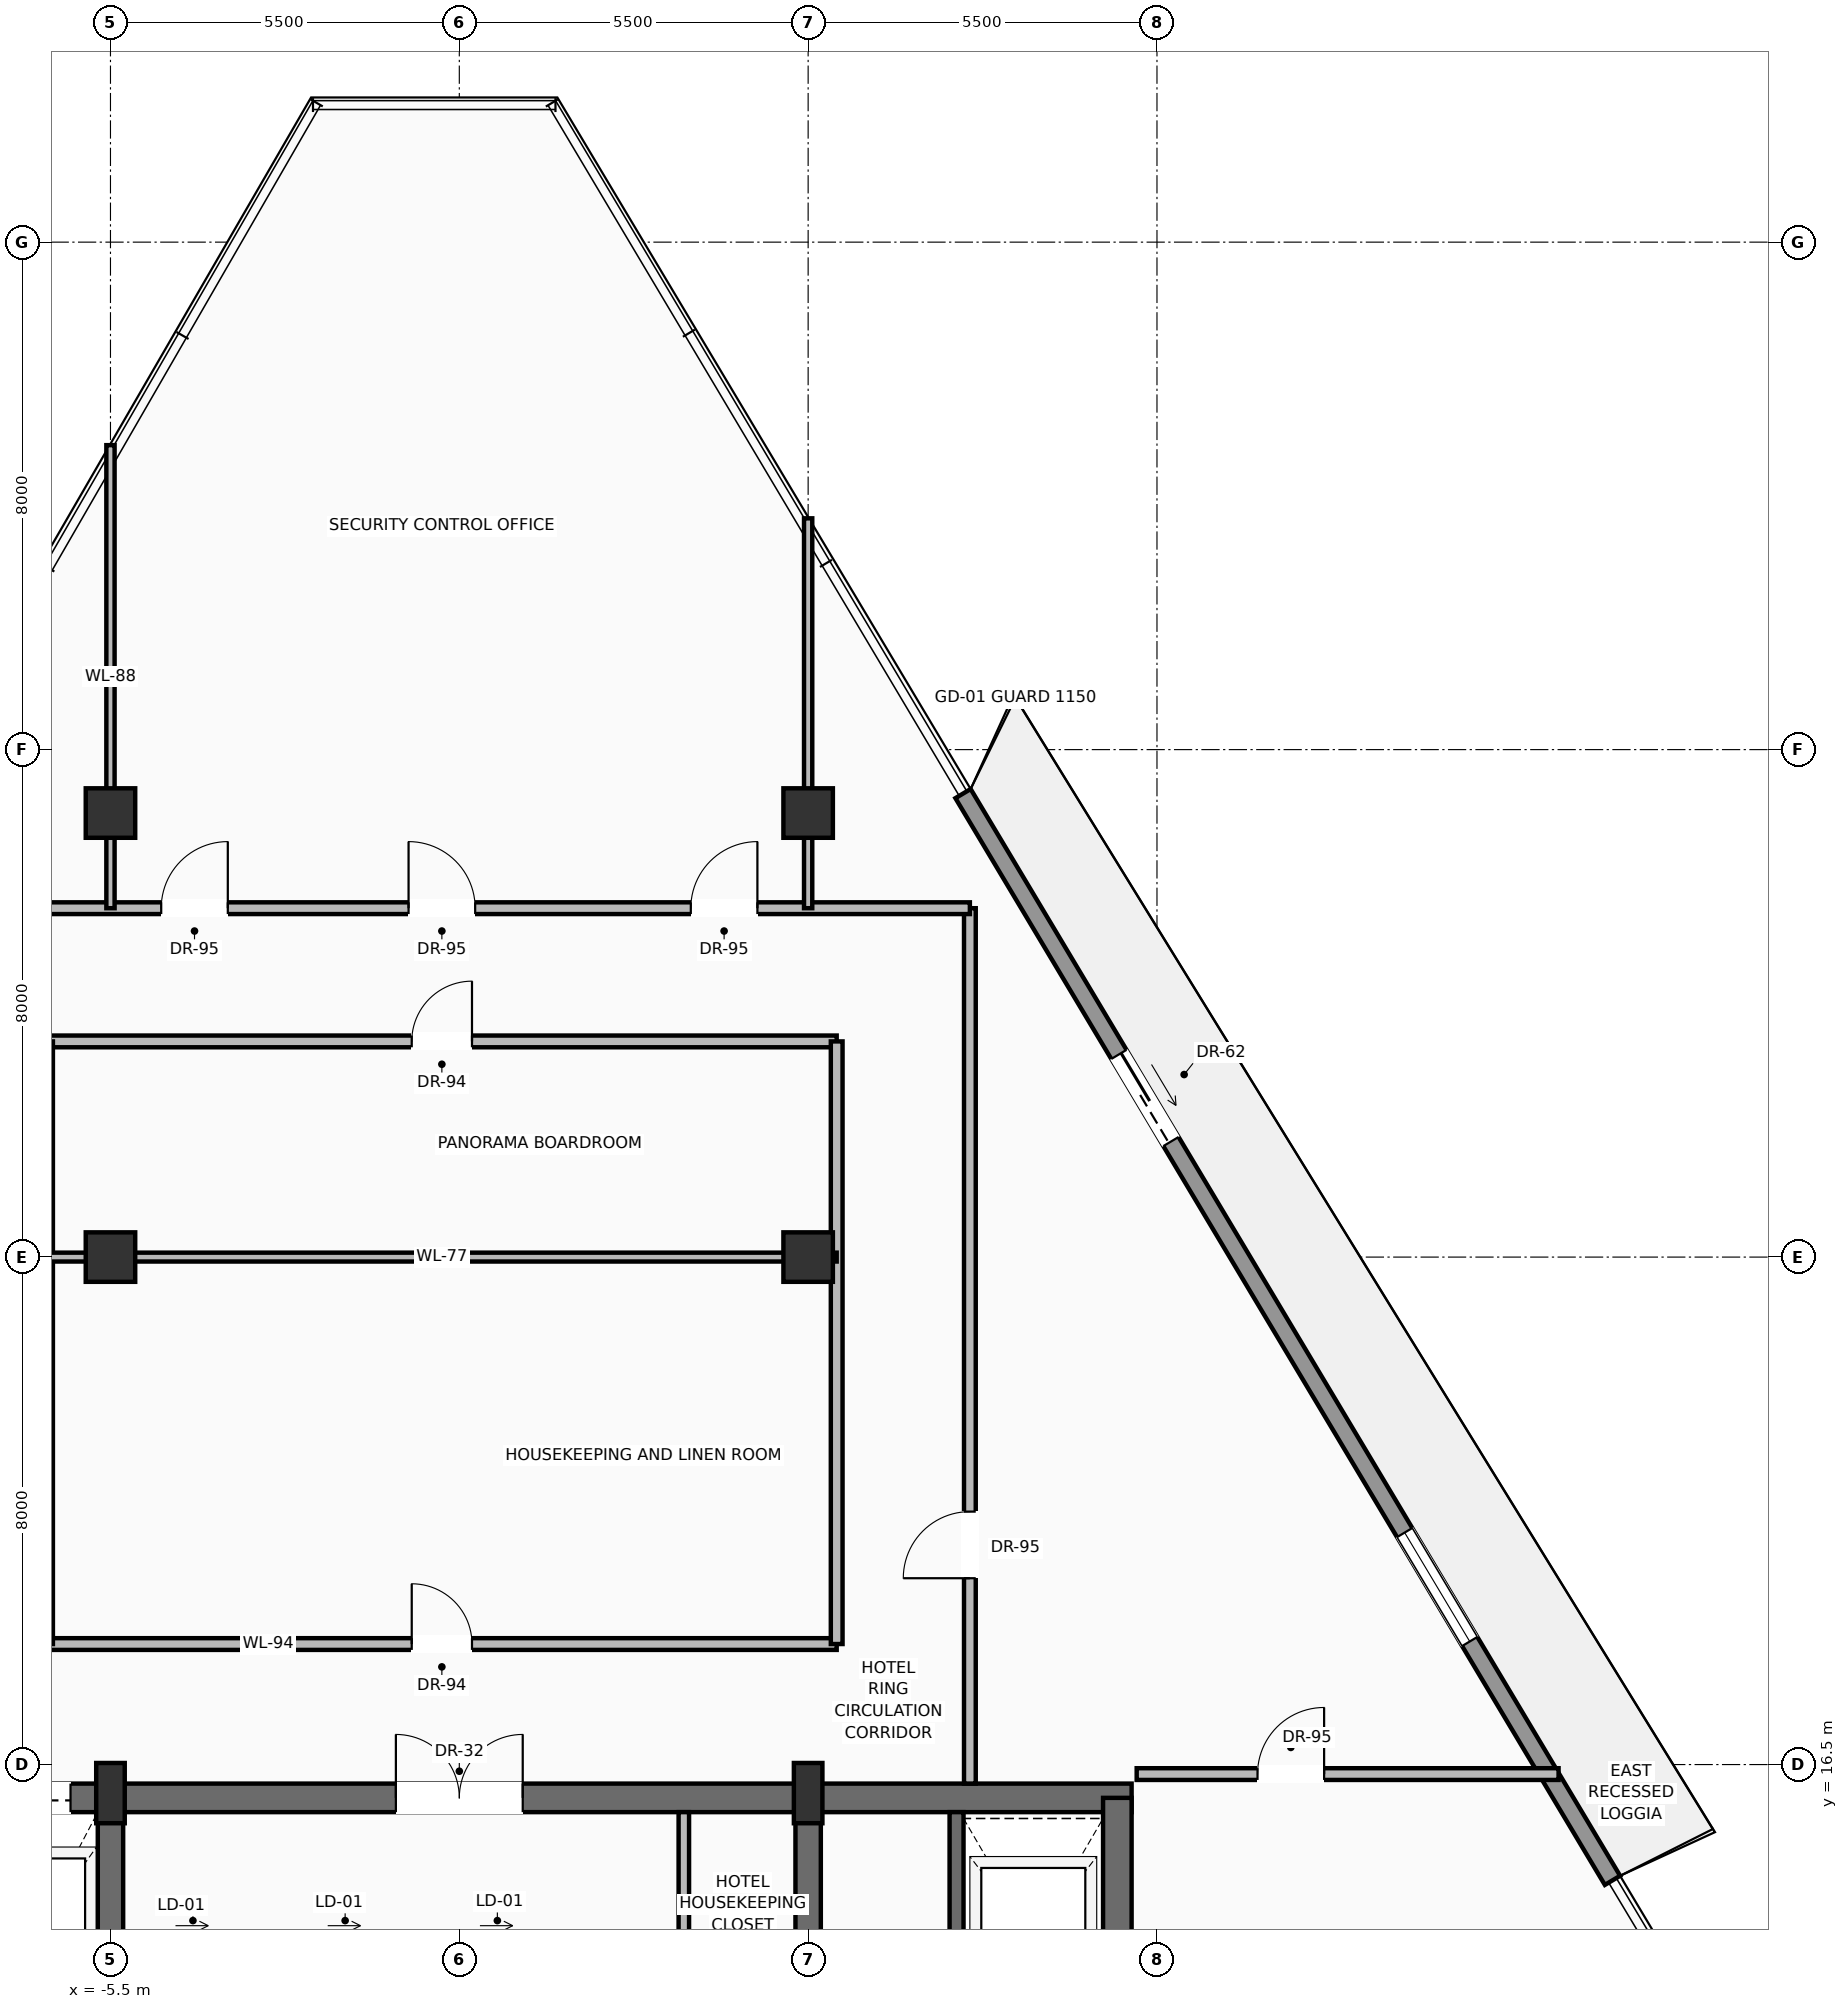
"""IFC4 building model, lengths in metres.
Left out: names, types, materials, properties, quantities, classifications, styles, units other than length and angle.
Written with IfcOpenShell. Run it as: python <this file> out.ifc"""

import sys

from ifc_helpers import new_model, si_unit, direction, frame, frame_2d, origin, origin_2d, place, context, subcontext, project, spatial, rectangle, extrude, source, transform, mapped, element, fill, save


model = new_model("IFC4")
c1 = context("Model", 3, precision=1e-05, world=origin(), true_north=direction((0.0, 1.0)))
c2 = subcontext(c1, "Body", "Model", "MODEL_VIEW")
j1 = project(units=[si_unit("LENGTHUNIT", "METRE"), si_unit("PLANEANGLEUNIT", "RADIAN")], contexts=[c1])
p1 = place(None, origin())
s1 = spatial("IfcSite", under=j1, at=p1, CompositionType="ELEMENT")
p2 = place(p1, origin())
s2 = spatial("IfcBuilding", under=s1, at=p2, CompositionType="ELEMENT")
p3 = place(p2, frame((0.0, 0.0, 269.55)))
s3 = spatial("IfcBuildingStorey", under=s2, at=p3, CompositionType="ELEMENT", Elevation=269.55)
p4 = place(p3, frame((-10.6, 15.975, 0.0), z_axis=(0.0, 0.0, 1.0), x_axis=(1.0, 0.0, 0.0)))
e1 = element("IfcWall", 1, at=p4, inside=s3, PredefinedType="SHEAR", context=c2, shape_type="SweptSolid", body=[
    extrude(rectangle(XDim=21.2, YDim=0.45, at=frame_2d((10.6, 0.0))), origin(), (0.0, 0.0, 1.0), 3.24),
])
p5 = place(p4, frame((3.17, 0.0, 0.0)))
e2 = element("IfcOpeningElement", 2, at=p5, cuts=e1, PredefinedType="OPENING", context=c2, shape_type="SweptSolid", body=[
    extrude(rectangle(XDim=1.3, YDim=2.3, at=frame_2d((0.65, 1.15))), frame((0.0, 0.235, 0.0), z_axis=(0.0, -1.0, 0.0), x_axis=(1.0, 0.0, 0.0)), (0.0, 0.0, 1.0), 0.47),
])
p6 = place(p4, frame((9.6, 0.0, 0.0)))
e3 = element("IfcOpeningElement", 3, at=p6, cuts=e1, PredefinedType="OPENING", context=c2, shape_type="SweptSolid", body=[
    extrude(rectangle(XDim=2.0, YDim=2.4, at=frame_2d((1.0, 1.2))), frame((0.0, 0.235, 0.0), z_axis=(0.0, -1.0, 0.0), x_axis=(1.0, 0.0, 0.0)), (0.0, 0.0, 1.0), 0.47),
])
p7 = place(p3, frame((10.375, 0.625, 0.0), z_axis=(0.0, 0.0, 1.0), x_axis=(0.0, 1.0, 0.0)))
e4 = element("IfcWall", 4, at=p7, inside=s3, PredefinedType="SHEAR", context=c2, shape_type="SweptSolid", body=[
    extrude(rectangle(XDim=15.35, YDim=0.45, at=frame_2d((7.675, 0.0))), origin(), (0.0, 0.0, 1.0), 3.24),
])
p8 = place(p3, frame((-5.5, 0.625, 0.0), z_axis=(0.0, 0.0, 1.0), x_axis=(0.0, 1.0, 0.0)))
e5 = element("IfcWall", 5, at=p8, inside=s3, PredefinedType="SHEAR", context=c2, shape_type="SweptSolid", body=[
    extrude(rectangle(XDim=15.35, YDim=0.4, at=frame_2d((7.675, 0.0))), origin(), (0.0, 0.0, 1.0), 3.24),
])
p9 = place(p8, frame((8.875, 0.0, 0.0)))
e6 = element("IfcOpeningElement", 6, at=p9, cuts=e5, PredefinedType="OPENING", context=c2, shape_type="SweptSolid", body=[
    extrude(rectangle(XDim=1.1, YDim=2.2, at=frame_2d((0.55, 1.1))), frame((0.0, 0.21, 0.0), z_axis=(0.0, -1.0, 0.0), x_axis=(1.0, 0.0, 0.0)), (0.0, 0.0, 1.0), 0.42),
])
p10 = place(p3, frame((5.5, 0.625, 0.0), z_axis=(0.0, 0.0, 1.0), x_axis=(0.0, 1.0, 0.0)))
e7 = element("IfcWall", 7, at=p10, inside=s3, PredefinedType="SHEAR", context=c2, shape_type="SweptSolid", body=[
    extrude(rectangle(XDim=15.35, YDim=0.4, at=frame_2d((7.675, 0.0))), origin(), (0.0, 0.0, 1.0), 3.24),
])
p11 = place(p10, frame((8.875, 0.0, 0.0)))
e8 = element("IfcOpeningElement", 8, at=p11, cuts=e7, PredefinedType="OPENING", context=c2, shape_type="SweptSolid", body=[
    extrude(rectangle(XDim=1.1, YDim=2.2, at=frame_2d((0.55, 1.1))), frame((0.0, 0.21, 0.0), z_axis=(0.0, -1.0, 0.0), x_axis=(1.0, 0.0, 0.0)), (0.0, 0.0, 1.0), 0.42),
])
m1 = source(origin(), c2, "Body", "SweptSolid", [
    extrude(rectangle(XDim=0.45, YDim=0.95, at=origin_2d()), origin(), (0.0, 0.0, 1.0), 3.45),
])
for number, where, z_axis, x_axis in (
    (9, (-5.5, 16.05, 0.0), (0.0, 0.0, 1.0), (1.0, 0.0, 0.0)),
    (10, (5.5, 16.05, 0.0), (0.0, 0.0, 1.0), (1.0, 0.0, 0.0)),
):
    element("IfcColumn", number, at=place(p3, frame(where, z_axis=z_axis, x_axis=x_axis)), inside=s3, PredefinedType="PILASTER", context=c2, shape_type="MappedRepresentation", body=[
        mapped(m1, transform((0.0, 0.0, 0.0), scale=1.0)),
    ])
m2 = source(origin(), c2, "Body", "SweptSolid", [
    extrude(rectangle(XDim=0.78, YDim=0.78, at=origin_2d()), origin(), (0.0, 0.0, 1.0), 3.45),
])
for number, where, z_axis, x_axis in (
    (11, (-5.5, 24.5, 0.0), (0.0, 0.0, 1.0), (1.0, 0.0, 0.0)),
    (12, (5.5, 24.5, 0.0), (0.0, 0.0, 1.0), (1.0, 0.0, 0.0)),
    (13, (-5.5, 31.5, 0.0), (0.0, 0.0, 1.0), (1.0, 0.0, 0.0)),
    (14, (5.5, 31.5, 0.0), (0.0, 0.0, 1.0), (1.0, 0.0, 0.0)),
):
    element("IfcColumn", number, at=place(p3, frame(where, z_axis=z_axis, x_axis=x_axis)), inside=s3, PredefinedType="COLUMN", context=c2, shape_type="MappedRepresentation", body=[
        mapped(m2, transform((0.0, 0.0, 0.0), scale=1.0)),
    ])
p12 = place(p3, frame((7.942, 31.807, 0.0), z_axis=(0.0, 0.0, 1.0), x_axis=(0.513039751496, -0.858364848642, 0.0)))
e15 = element("IfcWall", 15, at=p12, inside=s3, PredefinedType="SOLIDWALL", context=c2, shape_type="SweptSolid", body=[
    extrude(rectangle(XDim=19.959, YDim=0.28, at=frame_2d((9.979, 0.0))), origin(), (0.0, 0.0, 1.0), 2.82),
])
p13 = place(p12, frame((4.79, 0.0, 0.0)))
e16 = element("IfcOpeningElement", 16, at=p13, cuts=e15, PredefinedType="OPENING", context=c2, shape_type="SweptSolid", body=[
    extrude(rectangle(XDim=1.6, YDim=2.35, at=frame_2d((0.8, 1.175))), frame((0.0, 0.15, 0.0), z_axis=(0.0, -1.0, 0.0), x_axis=(1.0, 0.0, 0.0)), (0.0, 0.0, 1.0), 0.3),
])
p14 = place(p12, frame((13.572, 0.0, 0.9)))
e17 = element("IfcOpeningElement", 17, at=p14, cuts=e15, PredefinedType="OPENING", context=c2, shape_type="SweptSolid", body=[
    extrude(rectangle(XDim=2.0, YDim=1.75, at=frame_2d((1.0, 0.875))), frame((0.0, 0.15, 0.0), z_axis=(0.0, -1.0, 0.0), x_axis=(1.0, 0.0, 0.0)), (0.0, 0.0, 1.0), 0.3),
])
p15 = place(p3, frame((7.84, 11.87, 0.0), z_axis=(0.0, 0.0, 1.0), x_axis=(0.0, 1.0, 0.0)))
e18 = element("IfcWall", 18, at=p15, inside=s3, PredefinedType="SOLIDWALL", context=c2, shape_type="SweptSolid", body=[
    extrude(rectangle(XDim=3.88, YDim=0.22, at=frame_2d((1.94, 0.0))), origin(), (0.0, 0.0, 1.0), 3.24),
])
p16 = place(p3, frame((3.54, 11.22, 0.0), z_axis=(0.0, 0.0, 1.0), x_axis=(0.0, 1.0, 0.0)))
e19 = element("IfcWall", 19, at=p16, inside=s3, PredefinedType="PARTITIONING", context=c2, shape_type="SweptSolid", body=[
    extrude(rectangle(XDim=4.53, YDim=0.165, at=frame_2d((2.265, 0.0))), origin(), (0.0, 0.0, 1.0), 3.232),
])
p17 = place(p16, frame((1.25, 0.0, 0.0)))
e20 = element("IfcOpeningElement", 20, at=p17, cuts=e19, PredefinedType="OPENING", context=c2, shape_type="SweptSolid", body=[
    extrude(rectangle(XDim=0.9, YDim=2.1, at=frame_2d((0.45, 1.05))), frame((0.0, 0.093, 0.0), z_axis=(0.0, -1.0, 0.0), x_axis=(1.0, 0.0, 0.0)), (0.0, 0.0, 1.0), 0.185),
])
p18 = place(p3, frame((-6.5, 18.4, 0.0), z_axis=(0.0, 0.0, 1.0), x_axis=(1.0, 0.0, 0.0)))
e21 = element("IfcWall", 21, at=p18, inside=s3, PredefinedType="PARTITIONING", context=c2, shape_type="SweptSolid", body=[
    extrude(rectangle(XDim=12.45, YDim=0.185, at=frame_2d((6.225, 0.0))), origin(), (0.0, 0.0, 1.0), 3.232),
])
p19 = place(p18, frame((5.75, 0.0, 0.0)))
e22 = element("IfcOpeningElement", 22, at=p19, cuts=e21, PredefinedType="OPENING", context=c2, shape_type="SweptSolid", body=[
    extrude(rectangle(XDim=0.95, YDim=2.2, at=frame_2d((0.475, 1.1))), frame((0.0, 0.103, 0.0), z_axis=(0.0, -1.0, 0.0), x_axis=(1.0, 0.0, 0.0)), (0.0, 0.0, 1.0), 0.205),
])
p20 = place(p3, frame((-6.5, 27.9, 0.0), z_axis=(0.0, 0.0, 1.0), x_axis=(1.0, 0.0, 0.0)))
e23 = element("IfcWall", 23, at=p20, inside=s3, PredefinedType="PARTITIONING", context=c2, shape_type="SweptSolid", body=[
    extrude(rectangle(XDim=12.45, YDim=0.185, at=frame_2d((6.225, 0.0))), origin(), (0.0, 0.0, 1.0), 2.885),
])
p21 = place(p20, frame((5.75, 0.0, 0.0)))
e24 = element("IfcOpeningElement", 24, at=p21, cuts=e23, PredefinedType="OPENING", context=c2, shape_type="SweptSolid", body=[
    extrude(rectangle(XDim=0.95, YDim=2.2, at=frame_2d((0.475, 1.1))), frame((0.0, 0.103, 0.0), z_axis=(0.0, -1.0, 0.0), x_axis=(1.0, 0.0, 0.0)), (0.0, 0.0, 1.0), 0.205),
])
for number, where, z_axis, x_axis in (
    (25, (-6.5, 18.4, 0.0), (0.0, 0.0, 1.0), (0.0, 1.0, 0.0)),
    (26, (5.95, 18.4, 0.0), (0.0, 0.0, 1.0), (0.0, 1.0, 0.0)),
):
    element("IfcWall", number, at=place(p3, frame(where, z_axis=z_axis, x_axis=x_axis)), inside=s3, PredefinedType="PARTITIONING", context=c2, shape_type="SweptSolid", body=[
        extrude(rectangle(XDim=9.5, YDim=0.185, at=frame_2d((4.75, 0.0))), origin(), (0.0, 0.0, 1.0), 3.232),
    ])
p22 = place(p3, frame((8.05, 16.2, 0.0), z_axis=(0.0, 0.0, 1.0), x_axis=(0.0, 1.0, 0.0)))
e27 = element("IfcWall", 27, at=p22, inside=s3, PredefinedType="PARTITIONING", context=c2, shape_type="SweptSolid", body=[
    extrude(rectangle(XDim=13.8, YDim=0.185, at=frame_2d((6.9, 0.0))), origin(), (0.0, 0.0, 1.0), 3.232),
])
p23 = place(p22, frame((3.238, 0.0, 0.0)))
e28 = element("IfcOpeningElement", 28, at=p23, cuts=e27, PredefinedType="OPENING", context=c2, shape_type="SweptSolid", body=[
    extrude(rectangle(XDim=1.05, YDim=2.25, at=frame_2d((0.525, 1.125))), frame((0.0, 0.103, 0.0), z_axis=(0.0, -1.0, 0.0), x_axis=(1.0, 0.0, 0.0)), (0.0, 0.0, 1.0), 0.205),
])
p24 = place(p3, frame((-8.6, 30.0, 0.0), z_axis=(0.0, 0.0, 1.0), x_axis=(1.0, 0.0, 0.0)))
e29 = element("IfcWall", 29, at=p24, inside=s3, PredefinedType="PARTITIONING", context=c2, shape_type="SweptSolid", body=[
    extrude(rectangle(XDim=16.65, YDim=0.185, at=frame_2d((8.325, 0.0))), origin(), (0.0, 0.0, 1.0), 3.232),
])
p25 = place(p24, frame((3.9, 0.0, 0.0)))
e30 = element("IfcOpeningElement", 30, at=p25, cuts=e29, PredefinedType="OPENING", context=c2, shape_type="SweptSolid", body=[
    extrude(rectangle(XDim=1.05, YDim=2.25, at=frame_2d((0.525, 1.125))), frame((0.0, 0.103, 0.0), z_axis=(0.0, -1.0, 0.0), x_axis=(1.0, 0.0, 0.0)), (0.0, 0.0, 1.0), 0.205),
])
p26 = place(p24, frame((7.8, 0.0, 0.0)))
e31 = element("IfcOpeningElement", 31, at=p26, cuts=e29, PredefinedType="OPENING", context=c2, shape_type="SweptSolid", body=[
    extrude(rectangle(XDim=1.05, YDim=2.25, at=frame_2d((0.525, 1.125))), frame((0.0, 0.103, 0.0), z_axis=(0.0, -1.0, 0.0), x_axis=(1.0, 0.0, 0.0)), (0.0, 0.0, 1.0), 0.205),
])
p27 = place(p24, frame((12.25, 0.0, 0.0)))
e32 = element("IfcOpeningElement", 32, at=p27, cuts=e29, PredefinedType="OPENING", context=c2, shape_type="SweptSolid", body=[
    extrude(rectangle(XDim=1.05, YDim=2.25, at=frame_2d((0.525, 1.125))), frame((0.0, 0.103, 0.0), z_axis=(0.0, -1.0, 0.0), x_axis=(1.0, 0.0, 0.0)), (0.0, 0.0, 1.0), 0.205),
])
p28 = place(p3, frame((-6.5, 24.5, 0.0), z_axis=(0.0, 0.0, 1.0), x_axis=(1.0, 0.0, 0.0)))
e33 = element("IfcWall", 33, at=p28, inside=s3, PredefinedType="PARTITIONING", context=c2, shape_type="SweptSolid", body=[
    extrude(rectangle(XDim=12.45, YDim=0.14, at=frame_2d((6.225, 0.0))), origin(), (0.0, 0.0, 1.0), 2.683),
])
p29 = place(p3, frame((10.68, 16.35, 0.0), z_axis=(0.0, 0.0, 1.0), x_axis=(1.0, 0.0, 0.0)))
e34 = element("IfcWall", 34, at=p29, inside=s3, PredefinedType="PARTITIONING", context=c2, shape_type="SweptSolid", body=[
    extrude(rectangle(XDim=6.652, YDim=0.185, at=frame_2d((3.326, 0.0))), origin(), (0.0, 0.0, 1.0), 3.232),
])
p30 = place(p29, frame((1.905, 0.0, 0.0)))
e35 = element("IfcOpeningElement", 35, at=p30, cuts=e34, PredefinedType="OPENING", context=c2, shape_type="SweptSolid", body=[
    extrude(rectangle(XDim=1.05, YDim=2.25, at=frame_2d((0.525, 1.125))), frame((0.0, 0.103, 0.0), z_axis=(0.0, -1.0, 0.0), x_axis=(1.0, 0.0, 0.0)), (0.0, 0.0, 1.0), 0.205),
])
p31 = place(p3, frame((-5.5, 30.0, 0.0), z_axis=(0.0, 0.0, 1.0), x_axis=(0.0, 1.0, 0.0)))
e36 = element("IfcWall", 36, at=p31, inside=s3, PredefinedType="PARTITIONING", context=c2, shape_type="SweptSolid", body=[
    extrude(rectangle(XDim=7.3, YDim=0.13, at=frame_2d((3.65, 0.0))), origin(), (0.0, 0.0, 1.0), 2.683),
])
p32 = place(p3, frame((5.5, 30.0, 0.0), z_axis=(0.0, 0.0, 1.0), x_axis=(0.0, 1.0, 0.0)))
e37 = element("IfcWall", 37, at=p32, inside=s3, PredefinedType="PARTITIONING", context=c2, shape_type="SweptSolid", body=[
    extrude(rectangle(XDim=6.146, YDim=0.13, at=frame_2d((3.073, 0.0))), origin(), (0.0, 0.0, 1.0), 2.683),
])
m3 = source(origin(), c2, "Body", "SweptSolid", [
    extrude(rectangle(XDim=1.6, YDim=2.35, at=frame_2d((0.8, 1.175))), frame((0.0, 0.025, 0.0), z_axis=(0.0, -1.0, 0.0), x_axis=(1.0, 0.0, 0.0)), (0.0, 0.0, 1.0), 0.05),
])
p33 = place(p13, origin())
e38 = element("IfcDoor", 38, at=p33, inside=s3, OperationType="SLIDING_TO_RIGHT", PredefinedType="DOOR", context=c2, shape_type="MappedRepresentation", body=[
    mapped(m3, transform((0.0, 0.0, 0.0), scale=1.0)),
])
fill(e16, e38)
m4 = source(origin(), c2, "Body", "SweptSolid", [
    extrude(rectangle(XDim=2.0, YDim=1.75, at=frame_2d((1.0, 0.875))), frame((0.0, 0.03, 0.0), z_axis=(0.0, -1.0, 0.0), x_axis=(1.0, 0.0, 0.0)), (0.0, 0.0, 1.0), 0.06),
])
p34 = place(p14, origin())
e39 = element("IfcWindow", 39, at=p34, inside=s3, PartitioningType="SINGLE_PANEL", PredefinedType="WINDOW", context=c2, shape_type="MappedRepresentation", body=[
    mapped(m4, transform((0.0, 0.0, 0.0), scale=1.0)),
])
fill(e17, e39)
m5 = source(origin(), c2, "Body", "SweptSolid", [
    extrude(rectangle(XDim=1.3, YDim=2.3, at=frame_2d((0.65, 1.15))), frame((0.0, 0.025, 0.0), z_axis=(0.0, -1.0, 0.0), x_axis=(1.0, 0.0, 0.0)), (0.0, 0.0, 1.0), 0.05),
])
p35 = place(p5, origin())
e40 = element("IfcDoor", 40, at=p35, inside=s3, OperationType="SLIDING_TO_RIGHT", PredefinedType="DOOR", context=c2, shape_type="MappedRepresentation", body=[
    mapped(m5, transform((0.0, 0.0, 0.0), scale=1.0)),
])
fill(e2, e40)
m6 = source(origin(), c2, "Body", "SweptSolid", [
    extrude(rectangle(XDim=2.0, YDim=2.4, at=frame_2d((1.0, 1.2))), frame((0.0, 0.025, 0.0), z_axis=(0.0, -1.0, 0.0), x_axis=(1.0, 0.0, 0.0)), (0.0, 0.0, 1.0), 0.05),
])
p36 = place(p6, origin())
e41 = element("IfcDoor", 41, at=p36, inside=s3, OperationType="DOUBLE_DOOR_SINGLE_SWING", PredefinedType="DOOR", context=c2, shape_type="MappedRepresentation", body=[
    mapped(m6, transform((0.0, 0.0, 0.0), scale=1.0)),
])
fill(e3, e41)
m7 = source(origin(), c2, "Body", "SweptSolid", [
    extrude(rectangle(XDim=0.95, YDim=2.2, at=frame_2d((0.475, 1.1))), frame((0.0, 0.025, 0.0), z_axis=(0.0, -1.0, 0.0), x_axis=(1.0, 0.0, 0.0)), (0.0, 0.0, 1.0), 0.05),
])
p37 = place(p19, origin())
e42 = element("IfcDoor", 42, at=p37, inside=s3, OperationType="SINGLE_SWING_LEFT", PredefinedType="DOOR", context=c2, shape_type="MappedRepresentation", body=[
    mapped(m7, transform((0.0, 0.0, 0.0), scale=1.0)),
])
fill(e22, e42)
p38 = place(p21, origin())
e43 = element("IfcDoor", 43, at=p38, inside=s3, OperationType="SINGLE_SWING_RIGHT", PredefinedType="DOOR", context=c2, shape_type="MappedRepresentation", body=[
    mapped(m7, transform((0.0, 0.0, 0.0), scale=1.0)),
])
fill(e24, e43)
m8 = source(origin(), c2, "Body", "SweptSolid", [
    extrude(rectangle(XDim=1.05, YDim=2.25, at=frame_2d((0.525, 1.125))), frame((0.0, 0.025, 0.0), z_axis=(0.0, -1.0, 0.0), x_axis=(1.0, 0.0, 0.0)), (0.0, 0.0, 1.0), 0.05),
])
p39 = place(p30, origin())
e44 = element("IfcDoor", 44, at=p39, inside=s3, OperationType="SINGLE_SWING_RIGHT", PredefinedType="DOOR", context=c2, shape_type="MappedRepresentation", body=[
    mapped(m8, transform((0.0, 0.0, 0.0), scale=1.0)),
])
fill(e35, e44)
p40 = place(p23, origin())
e45 = element("IfcDoor", 45, at=p40, inside=s3, OperationType="SINGLE_SWING_LEFT", PredefinedType="DOOR", context=c2, shape_type="MappedRepresentation", body=[
    mapped(m8, transform((0.0, 0.0, 0.0), scale=1.0)),
])
fill(e28, e45)
p41 = place(p25, origin())
e46 = element("IfcDoor", 46, at=p41, inside=s3, OperationType="SINGLE_SWING_RIGHT", PredefinedType="DOOR", context=c2, shape_type="MappedRepresentation", body=[
    mapped(m8, transform((0.0, 0.0, 0.0), scale=1.0)),
])
fill(e30, e46)
p42 = place(p26, origin())
e47 = element("IfcDoor", 47, at=p42, inside=s3, OperationType="SINGLE_SWING_LEFT", PredefinedType="DOOR", context=c2, shape_type="MappedRepresentation", body=[
    mapped(m8, transform((0.0, 0.0, 0.0), scale=1.0)),
])
fill(e31, e47)
p43 = place(p27, origin())
e48 = element("IfcDoor", 48, at=p43, inside=s3, OperationType="SINGLE_SWING_RIGHT", PredefinedType="DOOR", context=c2, shape_type="MappedRepresentation", body=[
    mapped(m8, transform((0.0, 0.0, 0.0), scale=1.0)),
])
fill(e32, e48)
save(model, sys.argv[1])
